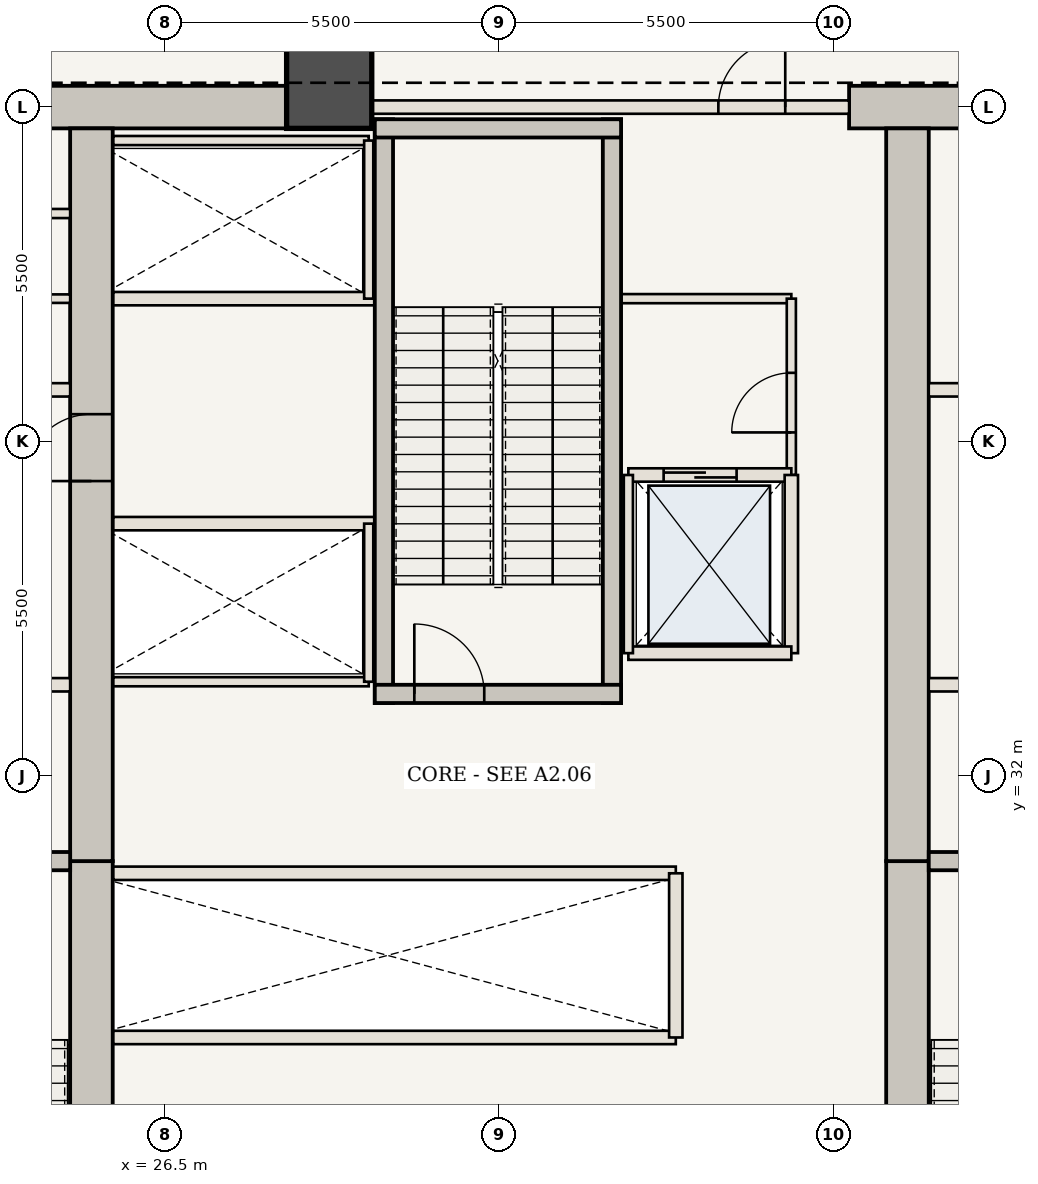
"""IFC4 building model, lengths in metres.
Left out: names, types, materials, properties, quantities, classifications, styles, units other than length and angle.
Written with IfcOpenShell. Run it as: python <this file> out.ifc"""

import sys

from ifc_helpers import new_model, si_unit, direction, frame, frame_2d, origin, origin_2d, place, context, subcontext, project, spatial, rectangle, extrude, element, fill, save


model = new_model("IFC4")
c1 = context("Model", 3, precision=1e-05, world=origin(), true_north=direction((0.0, 1.0)))
c2 = subcontext(c1, "Body", "Model", "MODEL_VIEW")
j1 = project(units=[si_unit("LENGTHUNIT", "METRE"), si_unit("PLANEANGLEUNIT", "RADIAN")], contexts=[c1])
p1 = place(None, origin())
s1 = spatial("IfcSite", under=j1, at=p1, CompositionType="ELEMENT")
p2 = place(p1, origin())
s2 = spatial("IfcBuilding", under=s1, at=p2, CompositionType="ELEMENT")
p3 = place(p2, frame((0.0, 0.0, 17.85)))
s3 = spatial("IfcBuildingStorey", under=s2, at=p3, CompositionType="ELEMENT", Elevation=17.85)
p4 = place(p3, frame((21.41, 43.0, 0.0), z_axis=(0.0, 0.0, 1.0), x_axis=(1.0, 0.0, 0.0)))
e1 = element("IfcWall", 1, at=p4, inside=s3, PredefinedType="SHEAR", context=c2, shape_type="SweptSolid", body=[
    extrude(rectangle(XDim=8.24, YDim=0.7, at=frame_2d((4.12, 0.0))), origin(), (0.0, 0.0, 1.0), 5.95),
])
p5 = place(p3, frame((37.75, 43.0, 0.0), z_axis=(0.0, 0.0, 1.0), x_axis=(1.0, 0.0, 0.0)))
e2 = element("IfcWall", 2, at=p5, inside=s3, PredefinedType="SHEAR", context=c2, shape_type="SweptSolid", body=[
    extrude(rectangle(XDim=4.84, YDim=0.7, at=frame_2d((2.42, 0.0))), origin(), (0.0, 0.0, 1.0), 5.95),
])
p6 = place(p3, frame((25.29, 21.3, 0.0), z_axis=(0.0, 0.0, 1.0), x_axis=(0.0, 1.0, 0.0)))
e3 = element("IfcWall", 3, at=p6, inside=s3, PredefinedType="SHEAR", context=c2, shape_type="SweptSolid", body=[
    extrude(rectangle(XDim=9.3, YDim=0.7, at=frame_2d((4.65, 0.0))), origin(), (0.0, 0.0, 1.0), 5.95),
])
p7 = place(p3, frame((25.29, 30.6, 0.0), z_axis=(0.0, 0.0, 1.0), x_axis=(0.0, 1.0, 0.0)))
e4 = element("IfcWall", 4, at=p7, inside=s3, PredefinedType="SHEAR", context=c2, shape_type="SweptSolid", body=[
    extrude(rectangle(XDim=12.05, YDim=0.7, at=frame_2d((6.025, 0.0))), origin(), (0.0, 0.0, 1.0), 5.95),
])
p8 = place(p7, frame((6.25, 0.0, 0.0)))
e5 = element("IfcOpeningElement", 5, at=p8, cuts=e4, PredefinedType="OPENING", context=c2, shape_type="SweptSolid", body=[
    extrude(rectangle(XDim=1.1, YDim=2.15, at=frame_2d((0.55, 1.075))), frame((0.0, 0.36, 0.0), z_axis=(0.0, -1.0, 0.0), x_axis=(1.0, 0.0, 0.0)), (0.0, 0.0, 1.0), 0.72),
])
p9 = place(p3, frame((38.71, 21.3, 0.0), z_axis=(0.0, 0.0, 1.0), x_axis=(0.0, 1.0, 0.0)))
e6 = element("IfcWall", 6, at=p9, inside=s3, PredefinedType="SHEAR", context=c2, shape_type="SweptSolid", body=[
    extrude(rectangle(XDim=9.3, YDim=0.7, at=frame_2d((4.65, 0.0))), origin(), (0.0, 0.0, 1.0), 5.95),
])
p10 = place(p3, frame((38.71, 30.6, 0.0), z_axis=(0.0, 0.0, 1.0), x_axis=(0.0, 1.0, 0.0)))
e7 = element("IfcWall", 7, at=p10, inside=s3, PredefinedType="SHEAR", context=c2, shape_type="SweptSolid", body=[
    extrude(rectangle(XDim=12.05, YDim=0.7, at=frame_2d((6.025, 0.0))), origin(), (0.0, 0.0, 1.0), 5.95),
])
p11 = place(p3, frame((29.2, 43.35, 0.0), z_axis=(0.0, 0.0, 1.0), x_axis=(1.0, 0.0, 0.0)))
e8 = element("IfcColumn", 8, at=p11, inside=s3, PredefinedType="COLUMN", context=c2, shape_type="SweptSolid", body=[
    extrude(rectangle(XDim=1.4, YDim=1.4, at=origin_2d()), origin(), (0.0, 0.0, 1.0), 5.95),
])
for number, where, z_axis, x_axis in (
    (9, (21.41, 30.6, 0.0), (0.0, 0.0, 1.0), (1.0, 0.0, 0.0)),
    (10, (39.06, 30.6, 0.0), (0.0, 0.0, 1.0), (1.0, 0.0, 0.0)),
):
    element("IfcWall", number, at=place(p3, frame(where, z_axis=z_axis, x_axis=x_axis)), inside=s3, PredefinedType="SHEAR", context=c2, shape_type="SweptSolid", body=[
        extrude(rectangle(XDim=3.53, YDim=0.3, at=frame_2d((1.765, 0.0))), origin(), (0.0, 0.0, 1.0), 5.71),
    ])
p12 = place(p3, frame((21.41, 33.5, 0.0), z_axis=(0.0, 0.0, 1.0), x_axis=(1.0, 0.0, 0.0)))
e11 = element("IfcWall", 11, at=p12, inside=s3, PredefinedType="STANDARD", context=c2, shape_type="SweptSolid", body=[
    extrude(rectangle(XDim=3.53, YDim=0.22, at=frame_2d((1.765, 0.0))), origin(), (0.0, 0.0, 1.0), 5.71),
])
p13 = place(p12, frame((0.75, 0.0, 0.0)))
e12 = element("IfcOpeningElement", 12, at=p13, cuts=e11, PredefinedType="OPENING", context=c2, shape_type="SweptSolid", body=[
    extrude(rectangle(XDim=1.2, YDim=2.2, at=frame_2d((0.6, 1.1))), frame((0.0, 0.12, 0.0), z_axis=(0.0, -1.0, 0.0), x_axis=(1.0, 0.0, 0.0)), (0.0, 0.0, 1.0), 0.24),
])
p14 = place(p3, frame((39.06, 33.5, 0.0), z_axis=(0.0, 0.0, 1.0), x_axis=(1.0, 0.0, 0.0)))
e13 = element("IfcWall", 13, at=p14, inside=s3, PredefinedType="STANDARD", context=c2, shape_type="SweptSolid", body=[
    extrude(rectangle(XDim=3.53, YDim=0.22, at=frame_2d((1.765, 0.0))), origin(), (0.0, 0.0, 1.0), 5.71),
])
p15 = place(p14, frame((1.55, 0.0, 0.0)))
e14 = element("IfcOpeningElement", 14, at=p15, cuts=e13, PredefinedType="OPENING", context=c2, shape_type="SweptSolid", body=[
    extrude(rectangle(XDim=1.2, YDim=2.2, at=frame_2d((0.6, 1.1))), frame((0.0, 0.12, 0.0), z_axis=(0.0, -1.0, 0.0), x_axis=(1.0, 0.0, 0.0)), (0.0, 0.0, 1.0), 0.24),
])
for number, where, z_axis, x_axis in (
    (15, (21.41, 38.35, 0.0), (0.0, 0.0, 1.0), (1.0, 0.0, 0.0)),
    (16, (39.06, 38.35, 0.0), (0.0, 0.0, 1.0), (1.0, 0.0, 0.0)),
):
    element("IfcWall", number, at=place(p3, frame(where, z_axis=z_axis, x_axis=x_axis)), inside=s3, PredefinedType="STANDARD", context=c2, shape_type="SweptSolid", body=[
        extrude(rectangle(XDim=3.53, YDim=0.22, at=frame_2d((1.765, 0.0))), origin(), (0.0, 0.0, 1.0), 5.71),
    ])
p16 = place(p3, frame((21.41, 39.85, 0.0), z_axis=(0.0, 0.0, 1.0), x_axis=(1.0, 0.0, 0.0)))
e17 = element("IfcWall", 17, at=p16, inside=s3, PredefinedType="STANDARD", context=c2, shape_type="SweptSolid", body=[
    extrude(rectangle(XDim=3.53, YDim=0.14, at=frame_2d((1.765, 0.0))), origin(), (0.0, 0.0, 1.0), 5.71),
])
p17 = place(p3, frame((21.41, 41.25, 0.0), z_axis=(0.0, 0.0, 1.0), x_axis=(1.0, 0.0, 0.0)))
e18 = element("IfcWall", 18, at=p17, inside=s3, PredefinedType="STANDARD", context=c2, shape_type="SweptSolid", body=[
    extrude(rectangle(XDim=3.53, YDim=0.15, at=frame_2d((1.765, 0.0))), origin(), (0.0, 0.0, 1.0), 5.71),
])
p18 = place(p3, frame((34.0, 39.85, 0.0), z_axis=(0.0, 0.0, 1.0), x_axis=(1.0, 0.0, 0.0)))
e19 = element("IfcWall", 19, at=p18, inside=s3, PredefinedType="STANDARD", context=c2, shape_type="SweptSolid", body=[
    extrude(rectangle(XDim=2.8, YDim=0.15, at=frame_2d((1.4, 0.0))), origin(), (0.0, 0.0, 1.0), 5.71),
])
p19 = place(p3, frame((36.8, 36.95, 0.0), z_axis=(0.0, 0.0, 1.0), x_axis=(0.0, 1.0, 0.0)))
e20 = element("IfcWall", 20, at=p19, inside=s3, PredefinedType="STANDARD", context=c2, shape_type="SweptSolid", body=[
    extrude(rectangle(XDim=2.9, YDim=0.15, at=frame_2d((1.45, 0.0))), origin(), (0.0, 0.0, 1.0), 5.71),
])
p20 = place(p19, frame((0.7, 0.0, 0.0)))
e21 = element("IfcOpeningElement", 21, at=p20, cuts=e20, PredefinedType="OPENING", context=c2, shape_type="SweptSolid", body=[
    extrude(rectangle(XDim=0.98, YDim=2.2, at=frame_2d((0.49, 1.1))), frame((0.0, 0.085, 0.0), z_axis=(0.0, -1.0, 0.0), x_axis=(1.0, 0.0, 0.0)), (0.0, 0.0, 1.0), 0.17),
])
for number, where, z_axis, x_axis in (
    (22, (25.65, 27.7, 0.0), (0.0, 0.0, 1.0), (1.0, 0.0, 0.0)),
    (23, (25.65, 30.4, 0.0), (0.0, 0.0, 1.0), (1.0, 0.0, 0.0)),
):
    element("IfcWall", number, at=place(p3, frame(where, z_axis=z_axis, x_axis=x_axis)), inside=s3, PredefinedType="STANDARD", context=c2, shape_type="SweptSolid", body=[
        extrude(rectangle(XDim=9.25, YDim=0.22, at=frame_2d((4.625, 0.0))), origin(), (0.0, 0.0, 1.0), 5.71),
    ])
p21 = place(p3, frame((34.9, 27.7, 0.0), z_axis=(0.0, 0.0, 1.0), x_axis=(0.0, 1.0, 0.0)))
e24 = element("IfcWall", 24, at=p21, inside=s3, PredefinedType="STANDARD", context=c2, shape_type="SweptSolid", body=[
    extrude(rectangle(XDim=2.7, YDim=0.22, at=frame_2d((1.35, 0.0))), origin(), (0.0, 0.0, 1.0), 5.71),
])
p22 = place(p3, frame((25.65, 36.15, 0.0), z_axis=(0.0, 0.0, 1.0), x_axis=(1.0, 0.0, 0.0)))
e25 = element("IfcWall", 25, at=p22, inside=s3, PredefinedType="STANDARD", context=c2, shape_type="SweptSolid", body=[
    extrude(rectangle(XDim=4.3, YDim=0.22, at=frame_2d((2.15, 0.0))), origin(), (0.0, 0.0, 1.0), 5.71),
])
p23 = place(p3, frame((25.65, 33.55, 0.0), z_axis=(0.0, 0.0, 1.0), x_axis=(1.0, 0.0, 0.0)))
e26 = element("IfcWall", 26, at=p23, inside=s3, PredefinedType="STANDARD", context=c2, shape_type="SweptSolid", body=[
    extrude(rectangle(XDim=4.2, YDim=0.15, at=frame_2d((2.1, 0.0))), origin(), (0.0, 0.0, 1.0), 5.71),
])
p24 = place(p3, frame((29.85, 33.55, 0.0), z_axis=(0.0, 0.0, 1.0), x_axis=(0.0, 1.0, 0.0)))
e27 = element("IfcWall", 27, at=p24, inside=s3, PredefinedType="STANDARD", context=c2, shape_type="SweptSolid", body=[
    extrude(rectangle(XDim=2.6, YDim=0.15, at=frame_2d((1.3, 0.0))), origin(), (0.0, 0.0, 1.0), 5.71),
])
p25 = place(p3, frame((25.65, 39.85, 0.0), z_axis=(0.0, 0.0, 1.0), x_axis=(1.0, 0.0, 0.0)))
e28 = element("IfcWall", 28, at=p25, inside=s3, PredefinedType="STANDARD", context=c2, shape_type="SweptSolid", body=[
    extrude(rectangle(XDim=4.3, YDim=0.22, at=frame_2d((2.15, 0.0))), origin(), (0.0, 0.0, 1.0), 5.71),
])
p26 = place(p3, frame((25.65, 42.45, 0.0), z_axis=(0.0, 0.0, 1.0), x_axis=(1.0, 0.0, 0.0)))
e29 = element("IfcWall", 29, at=p26, inside=s3, PredefinedType="STANDARD", context=c2, shape_type="SweptSolid", body=[
    extrude(rectangle(XDim=4.2, YDim=0.15, at=frame_2d((2.1, 0.0))), origin(), (0.0, 0.0, 1.0), 5.71),
])
p27 = place(p3, frame((29.85, 39.85, 0.0), z_axis=(0.0, 0.0, 1.0), x_axis=(0.0, 1.0, 0.0)))
e30 = element("IfcWall", 30, at=p27, inside=s3, PredefinedType="STANDARD", context=c2, shape_type="SweptSolid", body=[
    extrude(rectangle(XDim=2.6, YDim=0.15, at=frame_2d((1.3, 0.0))), origin(), (0.0, 0.0, 1.0), 5.71),
])
for number, where, z_axis, x_axis in (
    (31, (30.1, 33.2, 0.0), (0.0, 0.0, 1.0), (0.0, 1.0, 0.0)),
    (32, (33.85, 33.2, 0.0), (0.0, 0.0, 1.0), (0.0, 1.0, 0.0)),
):
    element("IfcWall", number, at=place(p3, frame(where, z_axis=z_axis, x_axis=x_axis)), inside=s3, PredefinedType="SHEAR", context=c2, shape_type="SweptSolid", body=[
        extrude(rectangle(XDim=9.6, YDim=0.3, at=frame_2d((4.8, 0.0))), origin(), (0.0, 0.0, 1.0), 5.71),
    ])
p28 = place(p3, frame((29.95, 33.35, 0.0), z_axis=(0.0, 0.0, 1.0), x_axis=(1.0, 0.0, 0.0)))
e33 = element("IfcWall", 33, at=p28, inside=s3, PredefinedType="SHEAR", context=c2, shape_type="SweptSolid", body=[
    extrude(rectangle(XDim=4.05, YDim=0.3, at=frame_2d((2.025, 0.0))), origin(), (0.0, 0.0, 1.0), 5.71),
])
p29 = place(p28, frame((0.65, 0.0, 0.0)))
e34 = element("IfcOpeningElement", 34, at=p29, cuts=e33, PredefinedType="OPENING", context=c2, shape_type="SweptSolid", body=[
    extrude(rectangle(XDim=1.15, YDim=2.15, at=frame_2d((0.575, 1.075))), frame((0.0, 0.16, 0.0), z_axis=(0.0, -1.0, 0.0), x_axis=(1.0, 0.0, 0.0)), (0.0, 0.0, 1.0), 0.32),
])
p30 = place(p3, frame((29.95, 42.65, 0.0), z_axis=(0.0, 0.0, 1.0), x_axis=(1.0, 0.0, 0.0)))
e35 = element("IfcWall", 35, at=p30, inside=s3, PredefinedType="SHEAR", context=c2, shape_type="SweptSolid", body=[
    extrude(rectangle(XDim=4.05, YDim=0.3, at=frame_2d((2.025, 0.0))), origin(), (0.0, 0.0, 1.0), 5.71),
])
p31 = place(p3, frame((29.65, 43.0, 0.0), z_axis=(0.0, 0.0, 1.0), x_axis=(1.0, 0.0, 0.0)))
e36 = element("IfcWall", 36, at=p31, inside=s3, PredefinedType="STANDARD", context=c2, shape_type="SweptSolid", body=[
    extrude(rectangle(XDim=8.1, YDim=0.22, at=frame_2d((4.05, 0.0))), origin(), (0.0, 0.0, 1.0), 5.71),
])
p32 = place(p31, frame((5.95, 0.0, 0.0)))
e37 = element("IfcOpeningElement", 37, at=p32, cuts=e36, PredefinedType="OPENING", context=c2, shape_type="SweptSolid", body=[
    extrude(rectangle(XDim=1.1, YDim=2.15, at=frame_2d((0.55, 1.075))), frame((0.0, 0.12, 0.0), z_axis=(0.0, -1.0, 0.0), x_axis=(1.0, 0.0, 0.0)), (0.0, 0.0, 1.0), 0.24),
])
p33 = place(p3, frame((34.12, 36.95, 0.0), z_axis=(0.0, 0.0, 1.0), x_axis=(1.0, 0.0, 0.0)))
e38 = element("IfcWall", 38, at=p33, inside=s3, PredefinedType="STANDARD", context=c2, shape_type="SweptSolid", body=[
    extrude(rectangle(XDim=2.68, YDim=0.22, at=frame_2d((1.34, 0.0))), origin(), (0.0, 0.0, 1.0), 5.71),
])
p34 = place(p33, frame((0.58, 0.0, 0.0)))
e39 = element("IfcOpeningElement", 39, at=p34, cuts=e38, PredefinedType="OPENING", context=c2, shape_type="SweptSolid", body=[
    extrude(rectangle(XDim=1.2, YDim=2.2, at=frame_2d((0.6, 1.1))), frame((0.0, 0.12, 0.0), z_axis=(0.0, -1.0, 0.0), x_axis=(1.0, 0.0, 0.0)), (0.0, 0.0, 1.0), 0.24),
])
p35 = place(p3, frame((36.8, 34.02, 0.0), z_axis=(0.0, 0.0, 1.0), x_axis=(0.0, 1.0, 0.0)))
e40 = element("IfcWall", 40, at=p35, inside=s3, PredefinedType="STANDARD", context=c2, shape_type="SweptSolid", body=[
    extrude(rectangle(XDim=2.93, YDim=0.22, at=frame_2d((1.465, 0.0))), origin(), (0.0, 0.0, 1.0), 5.71),
])
p36 = place(p3, frame((34.12, 34.02, 0.0), z_axis=(0.0, 0.0, 1.0), x_axis=(1.0, 0.0, 0.0)))
e41 = element("IfcWall", 41, at=p36, inside=s3, PredefinedType="STANDARD", context=c2, shape_type="SweptSolid", body=[
    extrude(rectangle(XDim=2.68, YDim=0.22, at=frame_2d((1.34, 0.0))), origin(), (0.0, 0.0, 1.0), 5.71),
])
p37 = place(p3, frame((34.12, 34.02, 0.0), z_axis=(0.0, 0.0, 1.0), x_axis=(0.0, 1.0, 0.0)))
e42 = element("IfcWall", 42, at=p37, inside=s3, PredefinedType="STANDARD", context=c2, shape_type="SweptSolid", body=[
    extrude(rectangle(XDim=2.93, YDim=0.15, at=frame_2d((1.465, 0.0))), origin(), (0.0, 0.0, 1.0), 5.71),
])
p38 = place(p8, origin())
e43 = element("IfcDoor", 43, at=p38, inside=s3, OperationType="SINGLE_SWING_LEFT", PredefinedType="DOOR", context=c2, shape_type="SweptSolid", body=[
    extrude(rectangle(XDim=1.1, YDim=2.15, at=frame_2d((0.55, 1.075))), frame((0.0, 0.025, 0.0), z_axis=(0.0, -1.0, 0.0), x_axis=(1.0, 0.0, 0.0)), (0.0, 0.0, 1.0), 0.05),
])
fill(e5, e43)
p39 = place(p20, origin())
e44 = element("IfcDoor", 44, at=p39, inside=s3, OperationType="SINGLE_SWING_LEFT", PredefinedType="DOOR", context=c2, shape_type="SweptSolid", body=[
    extrude(rectangle(XDim=0.98, YDim=2.2, at=frame_2d((0.49, 1.1))), frame((0.0, 0.025, 0.0), z_axis=(0.0, -1.0, 0.0), x_axis=(1.0, 0.0, 0.0)), (0.0, 0.0, 1.0), 0.05),
])
fill(e21, e44)
p40 = place(p29, origin())
e45 = element("IfcDoor", 45, at=p40, inside=s3, OperationType="SINGLE_SWING_LEFT", PredefinedType="DOOR", context=c2, shape_type="SweptSolid", body=[
    extrude(rectangle(XDim=1.15, YDim=2.15, at=frame_2d((0.575, 1.075))), frame((0.0, 0.025, 0.0), z_axis=(0.0, -1.0, 0.0), x_axis=(1.0, 0.0, 0.0)), (0.0, 0.0, 1.0), 0.05),
])
fill(e34, e45)
p41 = place(p32, origin())
e46 = element("IfcDoor", 46, at=p41, inside=s3, OperationType="SINGLE_SWING_RIGHT", PredefinedType="DOOR", context=c2, shape_type="SweptSolid", body=[
    extrude(rectangle(XDim=1.1, YDim=2.15, at=frame_2d((0.55, 1.075))), frame((0.0, 0.025, 0.0), z_axis=(0.0, -1.0, 0.0), x_axis=(1.0, 0.0, 0.0)), (0.0, 0.0, 1.0), 0.05),
])
fill(e37, e46)
p42 = place(p34, origin())
e47 = element("IfcDoor", 47, at=p42, inside=s3, OperationType="DOUBLE_DOOR_SLIDING", PredefinedType="DOOR", context=c2, shape_type="SweptSolid", body=[
    extrude(rectangle(XDim=1.2, YDim=2.2, at=frame_2d((0.6, 1.1))), frame((0.0, 0.025, 0.0), z_axis=(0.0, -1.0, 0.0), x_axis=(1.0, 0.0, 0.0)), (0.0, 0.0, 1.0), 0.05),
])
fill(e39, e47)
save(model, sys.argv[1])
